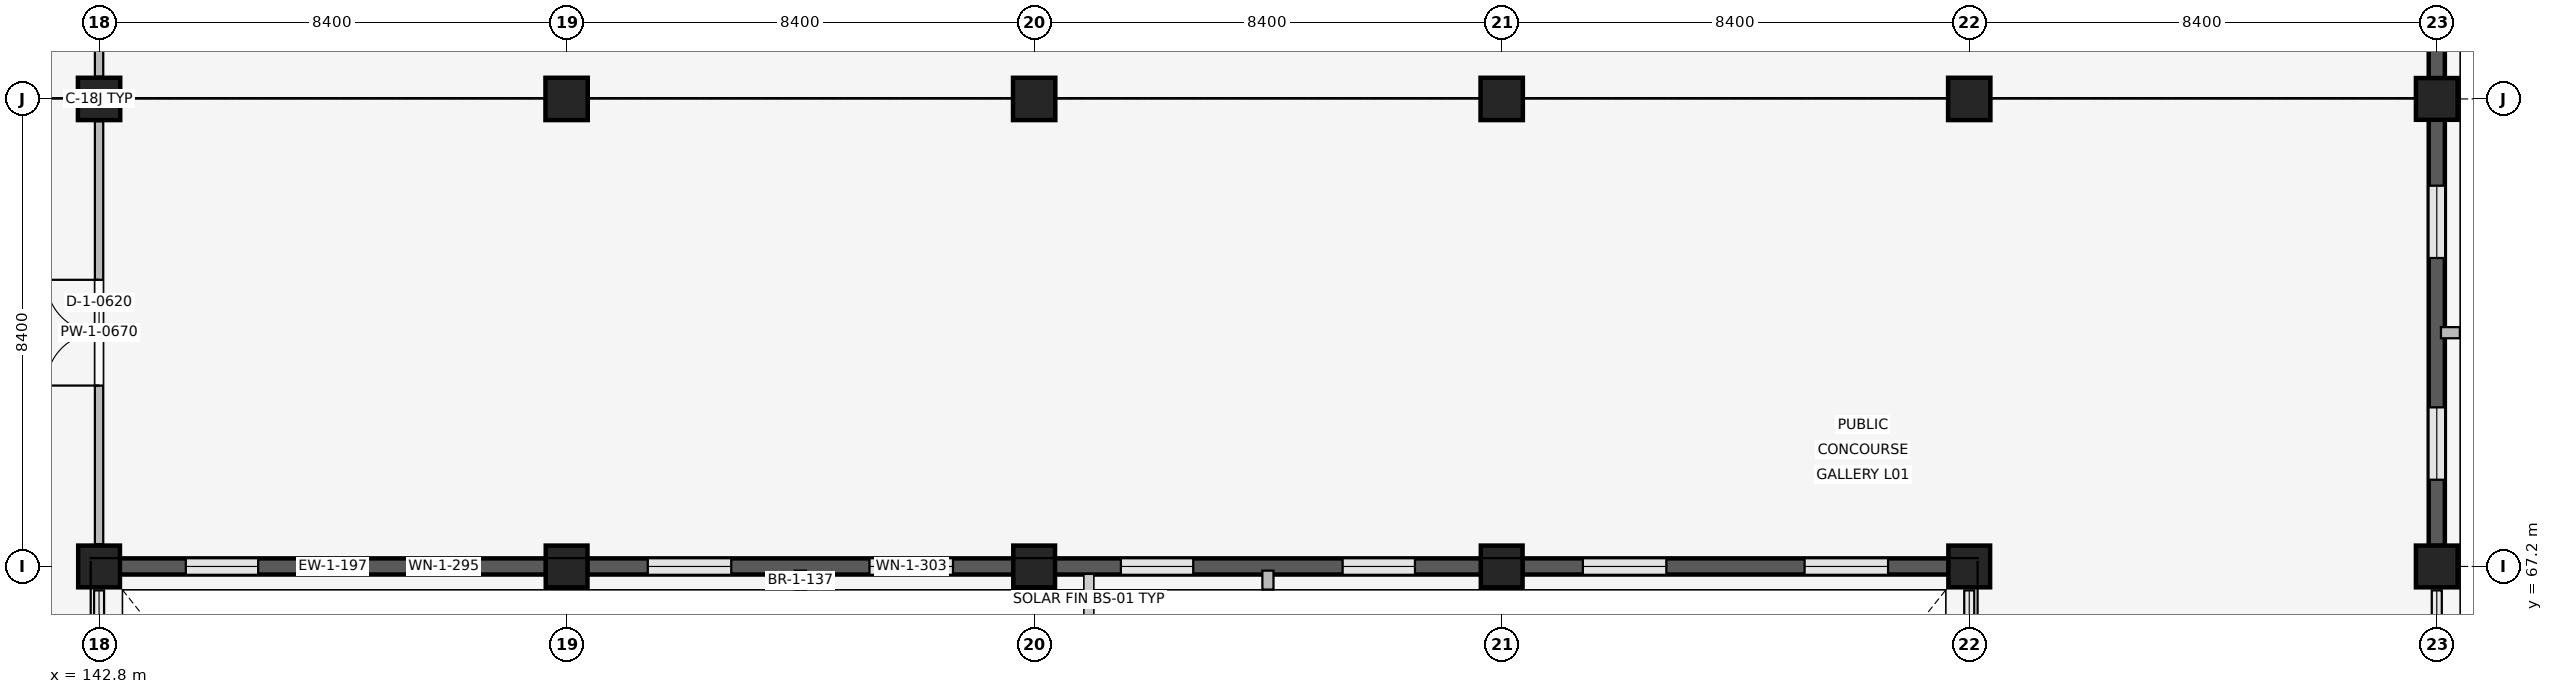
"""IFC4 building model, lengths in metres.
Left out: names, types, materials, properties, quantities, classifications, styles, units other than length and angle.
Written with IfcOpenShell. Run it as: python <this file> out.ifc"""

import sys

from ifc_helpers import new_model, si_unit, direction, frame, frame_2d, origin, origin_2d, place, context, subcontext, project, spatial, rectangle, extrude, element, fill, save


model = new_model("IFC4")
c1 = context("Model", 3, precision=1e-05, world=origin(), true_north=direction((0.0, 1.0)))
c2 = subcontext(c1, "Body", "Model", "MODEL_VIEW")
j1 = project(units=[si_unit("LENGTHUNIT", "METRE"), si_unit("PLANEANGLEUNIT", "RADIAN")], contexts=[c1])
p1 = place(None, origin())
s1 = spatial("IfcSite", under=j1, at=p1, CompositionType="ELEMENT")
p2 = place(p1, origin())
s2 = spatial("IfcBuilding", under=s1, at=p2, CompositionType="ELEMENT")
p3 = place(p2, frame((0.0, 0.0, 4.8)))
s3 = spatial("IfcBuildingStorey", under=s2, at=p3, CompositionType="ELEMENT", Elevation=4.8)
p4 = place(p3, frame((142.8, 67.2, 0.0), z_axis=(0.0, 0.0, 1.0), x_axis=(1.0, 0.0, 0.0)))
e1 = element("IfcColumn", 1, at=p4, inside=s3, PredefinedType="COLUMN", context=c2, shape_type="SweptSolid", body=[
    extrude(rectangle(XDim=0.75, YDim=0.75, at=origin_2d()), origin(), (0.0, 0.0, 1.0), 3.3),
])
p5 = place(p3, frame((142.8, 75.6, 0.0), z_axis=(0.0, 0.0, 1.0), x_axis=(1.0, 0.0, 0.0)))
e2 = element("IfcColumn", 2, at=p5, inside=s3, PredefinedType="COLUMN", context=c2, shape_type="SweptSolid", body=[
    extrude(rectangle(XDim=0.76, YDim=0.76, at=origin_2d()), origin(), (0.0, 0.0, 1.0), 3.3),
])
p6 = place(p3, frame((151.2, 67.2, 0.0), z_axis=(0.0, 0.0, 1.0), x_axis=(1.0, 0.0, 0.0)))
e3 = element("IfcColumn", 3, at=p6, inside=s3, PredefinedType="COLUMN", context=c2, shape_type="SweptSolid", body=[
    extrude(rectangle(XDim=0.75, YDim=0.75, at=origin_2d()), origin(), (0.0, 0.0, 1.0), 3.3),
])
p7 = place(p3, frame((151.2, 75.6, 0.0), z_axis=(0.0, 0.0, 1.0), x_axis=(1.0, 0.0, 0.0)))
e4 = element("IfcColumn", 4, at=p7, inside=s3, PredefinedType="COLUMN", context=c2, shape_type="SweptSolid", body=[
    extrude(rectangle(XDim=0.76, YDim=0.76, at=origin_2d()), origin(), (0.0, 0.0, 1.0), 3.3),
])
p8 = place(p3, frame((159.6, 67.2, 0.0), z_axis=(0.0, 0.0, 1.0), x_axis=(1.0, 0.0, 0.0)))
e5 = element("IfcColumn", 5, at=p8, inside=s3, PredefinedType="COLUMN", context=c2, shape_type="SweptSolid", body=[
    extrude(rectangle(XDim=0.75, YDim=0.75, at=origin_2d()), origin(), (0.0, 0.0, 1.0), 3.3),
])
p9 = place(p3, frame((159.6, 75.6, 0.0), z_axis=(0.0, 0.0, 1.0), x_axis=(1.0, 0.0, 0.0)))
e6 = element("IfcColumn", 6, at=p9, inside=s3, PredefinedType="COLUMN", context=c2, shape_type="SweptSolid", body=[
    extrude(rectangle(XDim=0.76, YDim=0.76, at=origin_2d()), origin(), (0.0, 0.0, 1.0), 3.3),
])
p10 = place(p3, frame((168.0, 67.2, 0.0), z_axis=(0.0, 0.0, 1.0), x_axis=(1.0, 0.0, 0.0)))
e7 = element("IfcColumn", 7, at=p10, inside=s3, PredefinedType="COLUMN", context=c2, shape_type="SweptSolid", body=[
    extrude(rectangle(XDim=0.75, YDim=0.75, at=origin_2d()), origin(), (0.0, 0.0, 1.0), 3.3),
])
p11 = place(p3, frame((168.0, 75.6, 0.0), z_axis=(0.0, 0.0, 1.0), x_axis=(1.0, 0.0, 0.0)))
e8 = element("IfcColumn", 8, at=p11, inside=s3, PredefinedType="COLUMN", context=c2, shape_type="SweptSolid", body=[
    extrude(rectangle(XDim=0.76, YDim=0.76, at=origin_2d()), origin(), (0.0, 0.0, 1.0), 3.3),
])
p12 = place(p3, frame((176.4, 67.2, 0.0), z_axis=(0.0, 0.0, 1.0), x_axis=(1.0, 0.0, 0.0)))
e9 = element("IfcColumn", 9, at=p12, inside=s3, PredefinedType="COLUMN", context=c2, shape_type="SweptSolid", body=[
    extrude(rectangle(XDim=0.75, YDim=0.75, at=origin_2d()), origin(), (0.0, 0.0, 1.0), 3.3),
])
p13 = place(p3, frame((176.4, 75.6, 0.0), z_axis=(0.0, 0.0, 1.0), x_axis=(1.0, 0.0, 0.0)))
e10 = element("IfcColumn", 10, at=p13, inside=s3, PredefinedType="COLUMN", context=c2, shape_type="SweptSolid", body=[
    extrude(rectangle(XDim=0.76, YDim=0.76, at=origin_2d()), origin(), (0.0, 0.0, 1.0), 3.3),
])
for number, where, z_axis, x_axis in (
    (11, (184.8, 67.2, 0.0), (0.0, 0.0, 1.0), (1.0, 0.0, 0.0)),
    (12, (184.8, 75.6, 0.0), (0.0, 0.0, 1.0), (1.0, 0.0, 0.0)),
):
    element("IfcColumn", number, at=place(p3, frame(where, z_axis=z_axis, x_axis=x_axis)), inside=s3, PredefinedType="COLUMN", context=c2, shape_type="SweptSolid", body=[
        extrude(rectangle(XDim=0.75, YDim=0.75, at=origin_2d()), origin(), (0.0, 0.0, 1.0), 3.3),
    ])
p14 = place(p3, frame((150.83, 67.2, 0.0), z_axis=(0.0, 0.0, 1.0), x_axis=(-1.0, 0.0, 0.0)))
e13 = element("IfcWall", 13, at=p14, inside=s3, PredefinedType="SOLIDWALL", context=c2, shape_type="SweptSolid", body=[
    extrude(rectangle(XDim=7.66, YDim=0.29, at=frame_2d((3.83, 0.0))), origin(), (0.0, 0.0, 1.0), 2.42),
])
p15 = place(p14, frame((1.188, 0.0, 1.05)))
e14 = element("IfcOpeningElement", 14, at=p15, cuts=e13, PredefinedType="OPENING", context=c2, shape_type="SweptSolid", body=[
    extrude(rectangle(XDim=1.3, YDim=0.75, at=frame_2d((0.65, 0.375))), frame((0.0, 0.155, 0.0), z_axis=(0.0, -1.0, 0.0), x_axis=(1.0, 0.0, 0.0)), (0.0, 0.0, 1.0), 0.31),
])
p16 = place(p14, frame((5.172, 0.0, 1.05)))
e15 = element("IfcOpeningElement", 15, at=p16, cuts=e13, PredefinedType="OPENING", context=c2, shape_type="SweptSolid", body=[
    extrude(rectangle(XDim=1.3, YDim=0.75, at=frame_2d((0.65, 0.375))), frame((0.0, 0.155, 0.0), z_axis=(0.0, -1.0, 0.0), x_axis=(1.0, 0.0, 0.0)), (0.0, 0.0, 1.0), 0.31),
])
p17 = place(p3, frame((159.23, 67.2, 0.0), z_axis=(0.0, 0.0, 1.0), x_axis=(-1.0, 0.0, 0.0)))
e16 = element("IfcWall", 16, at=p17, inside=s3, PredefinedType="SOLIDWALL", context=c2, shape_type="SweptSolid", body=[
    extrude(rectangle(XDim=7.66, YDim=0.29, at=frame_2d((3.83, 0.0))), origin(), (0.0, 0.0, 1.0), 2.42),
])
p18 = place(p17, frame((1.088, 0.0, 1.05)))
e17 = element("IfcOpeningElement", 17, at=p18, cuts=e16, PredefinedType="OPENING", context=c2, shape_type="SweptSolid", body=[
    extrude(rectangle(XDim=1.5, YDim=0.75, at=frame_2d((0.75, 0.375))), frame((0.0, 0.155, 0.0), z_axis=(0.0, -1.0, 0.0), x_axis=(1.0, 0.0, 0.0)), (0.0, 0.0, 1.0), 0.31),
])
p19 = place(p17, frame((5.072, 0.0, 1.05)))
e18 = element("IfcOpeningElement", 18, at=p19, cuts=e16, PredefinedType="OPENING", context=c2, shape_type="SweptSolid", body=[
    extrude(rectangle(XDim=1.5, YDim=0.75, at=frame_2d((0.75, 0.375))), frame((0.0, 0.155, 0.0), z_axis=(0.0, -1.0, 0.0), x_axis=(1.0, 0.0, 0.0)), (0.0, 0.0, 1.0), 0.31),
])
p20 = place(p3, frame((155.4, 67.125, 0.0), z_axis=(0.0, 0.0, 1.0), x_axis=(0.0, -1.0, 0.0)))
e19 = element("IfcWall", 19, at=p20, inside=s3, PredefinedType="ELEMENTEDWALL", context=c2, shape_type="SweptSolid", body=[
    extrude(rectangle(XDim=0.34, YDim=0.2, at=frame_2d((0.17, 0.0))), origin(), (0.0, 0.0, 1.0), 2.4),
])
p21 = place(p3, frame((167.63, 67.2, 0.0), z_axis=(0.0, 0.0, 1.0), x_axis=(-1.0, 0.0, 0.0)))
e20 = element("IfcWall", 20, at=p21, inside=s3, PredefinedType="SOLIDWALL", context=c2, shape_type="SweptSolid", body=[
    extrude(rectangle(XDim=7.66, YDim=0.29, at=frame_2d((3.83, 0.0))), origin(), (0.0, 0.0, 1.0), 2.42),
])
p22 = place(p21, frame((1.188, 0.0, 1.05)))
e21 = element("IfcOpeningElement", 21, at=p22, cuts=e20, PredefinedType="OPENING", context=c2, shape_type="SweptSolid", body=[
    extrude(rectangle(XDim=1.3, YDim=0.75, at=frame_2d((0.65, 0.375))), frame((0.0, 0.155, 0.0), z_axis=(0.0, -1.0, 0.0), x_axis=(1.0, 0.0, 0.0)), (0.0, 0.0, 1.0), 0.31),
])
p23 = place(p21, frame((5.172, 0.0, 1.05)))
e22 = element("IfcOpeningElement", 22, at=p23, cuts=e20, PredefinedType="OPENING", context=c2, shape_type="SweptSolid", body=[
    extrude(rectangle(XDim=1.3, YDim=0.75, at=frame_2d((0.65, 0.375))), frame((0.0, 0.155, 0.0), z_axis=(0.0, -1.0, 0.0), x_axis=(1.0, 0.0, 0.0)), (0.0, 0.0, 1.0), 0.31),
])
p24 = place(p3, frame((163.8, 67.125, 0.0), z_axis=(0.0, 0.0, 1.0), x_axis=(0.0, -1.0, 0.0)))
e23 = element("IfcWall", 23, at=p24, inside=s3, PredefinedType="ELEMENTEDWALL", context=c2, shape_type="SweptSolid", body=[
    extrude(rectangle(XDim=0.34, YDim=0.2, at=frame_2d((0.17, 0.0))), origin(), (0.0, 0.0, 1.0), 2.4),
])
p25 = place(p3, frame((176.03, 67.2, 0.0), z_axis=(0.0, 0.0, 1.0), x_axis=(-1.0, 0.0, 0.0)))
e24 = element("IfcWall", 24, at=p25, inside=s3, PredefinedType="SOLIDWALL", context=c2, shape_type="SweptSolid", body=[
    extrude(rectangle(XDim=7.66, YDim=0.29, at=frame_2d((3.83, 0.0))), origin(), (0.0, 0.0, 1.0), 2.42),
])
p26 = place(p25, frame((1.088, 0.0, 1.05)))
e25 = element("IfcOpeningElement", 25, at=p26, cuts=e24, PredefinedType="OPENING", context=c2, shape_type="SweptSolid", body=[
    extrude(rectangle(XDim=1.5, YDim=0.75, at=frame_2d((0.75, 0.375))), frame((0.0, 0.155, 0.0), z_axis=(0.0, -1.0, 0.0), x_axis=(1.0, 0.0, 0.0)), (0.0, 0.0, 1.0), 0.31),
])
p27 = place(p25, frame((5.072, 0.0, 1.05)))
e26 = element("IfcOpeningElement", 26, at=p27, cuts=e24, PredefinedType="OPENING", context=c2, shape_type="SweptSolid", body=[
    extrude(rectangle(XDim=1.5, YDim=0.75, at=frame_2d((0.75, 0.375))), frame((0.0, 0.155, 0.0), z_axis=(0.0, -1.0, 0.0), x_axis=(1.0, 0.0, 0.0)), (0.0, 0.0, 1.0), 0.31),
])
p28 = place(p3, frame((184.8, 75.23, 0.0), z_axis=(0.0, 0.0, 1.0), x_axis=(0.0, -1.0, 0.0)))
e27 = element("IfcWall", 27, at=p28, inside=s3, PredefinedType="SOLIDWALL", context=c2, shape_type="SweptSolid", body=[
    extrude(rectangle(XDim=7.66, YDim=0.29, at=frame_2d((3.83, 0.0))), origin(), (0.0, 0.0, 1.0), 2.42),
])
p29 = place(p28, frame((1.188, 0.0, 1.05)))
e28 = element("IfcOpeningElement", 28, at=p29, cuts=e27, PredefinedType="OPENING", context=c2, shape_type="SweptSolid", body=[
    extrude(rectangle(XDim=1.3, YDim=0.75, at=frame_2d((0.65, 0.375))), frame((0.0, 0.155, 0.0), z_axis=(0.0, -1.0, 0.0), x_axis=(1.0, 0.0, 0.0)), (0.0, 0.0, 1.0), 0.31),
])
p30 = place(p28, frame((5.172, 0.0, 1.05)))
e29 = element("IfcOpeningElement", 29, at=p30, cuts=e27, PredefinedType="OPENING", context=c2, shape_type="SweptSolid", body=[
    extrude(rectangle(XDim=1.3, YDim=0.75, at=frame_2d((0.65, 0.375))), frame((0.0, 0.155, 0.0), z_axis=(0.0, -1.0, 0.0), x_axis=(1.0, 0.0, 0.0)), (0.0, 0.0, 1.0), 0.31),
])
p31 = place(p3, frame((184.875, 71.4, 0.0), z_axis=(0.0, 0.0, 1.0), x_axis=(1.0, 0.0, 0.0)))
e30 = element("IfcWall", 30, at=p31, inside=s3, PredefinedType="ELEMENTEDWALL", context=c2, shape_type="SweptSolid", body=[
    extrude(rectangle(XDim=0.34, YDim=0.2, at=frame_2d((0.17, 0.0))), origin(), (0.0, 0.0, 1.0), 2.4),
])
p32 = place(p3, frame((184.8, 83.63, 0.0), z_axis=(0.0, 0.0, 1.0), x_axis=(0.0, -1.0, 0.0)))
e31 = element("IfcWall", 31, at=p32, inside=s3, PredefinedType="SOLIDWALL", context=c2, shape_type="SweptSolid", body=[
    extrude(rectangle(XDim=7.66, YDim=0.29, at=frame_2d((3.83, 0.0))), origin(), (0.0, 0.0, 1.0), 2.42),
])
p33 = place(p32, frame((1.088, 0.0, 1.05)))
e32 = element("IfcOpeningElement", 32, at=p33, cuts=e31, PredefinedType="OPENING", context=c2, shape_type="SweptSolid", body=[
    extrude(rectangle(XDim=1.5, YDim=0.75, at=frame_2d((0.75, 0.375))), frame((0.0, 0.155, 0.0), z_axis=(0.0, -1.0, 0.0), x_axis=(1.0, 0.0, 0.0)), (0.0, 0.0, 1.0), 0.31),
])
p34 = place(p32, frame((5.072, 0.0, 1.05)))
e33 = element("IfcOpeningElement", 33, at=p34, cuts=e31, PredefinedType="OPENING", context=c2, shape_type="SweptSolid", body=[
    extrude(rectangle(XDim=1.5, YDim=0.75, at=frame_2d((0.75, 0.375))), frame((0.0, 0.155, 0.0), z_axis=(0.0, -1.0, 0.0), x_axis=(1.0, 0.0, 0.0)), (0.0, 0.0, 1.0), 0.31),
])
p35 = place(p3, frame((142.8, 67.6, 0.0), z_axis=(0.0, 0.0, 1.0), x_axis=(0.0, 1.0, 0.0)))
e34 = element("IfcWall", 34, at=p35, inside=s3, PredefinedType="PARTITIONING", context=c2, shape_type="SweptSolid", body=[
    extrude(rectangle(XDim=7.6, YDim=0.15, at=frame_2d((3.8, 0.0))), origin(), (0.0, 0.0, 1.0), 2.4),
])
p36 = place(p35, frame((2.85, 0.0, 0.0)))
e35 = element("IfcOpeningElement", 35, at=p36, cuts=e34, PredefinedType="OPENING", context=c2, shape_type="SweptSolid", body=[
    extrude(rectangle(XDim=1.9, YDim=2.32, at=frame_2d((0.95, 1.16))), frame((0.0, 0.085, 0.0), z_axis=(0.0, -1.0, 0.0), x_axis=(1.0, 0.0, 0.0)), (0.0, 0.0, 1.0), 0.17),
])
p37 = place(p3, frame((142.8, 76.0, 0.0), z_axis=(0.0, 0.0, 1.0), x_axis=(0.0, 1.0, 0.0)))
e36 = element("IfcWall", 36, at=p37, inside=s3, PredefinedType="PARTITIONING", context=c2, shape_type="SweptSolid", body=[
    extrude(rectangle(XDim=24.4, YDim=0.15, at=frame_2d((12.2, 0.0))), origin(), (0.0, 0.0, 1.0), 2.4),
])
p38 = place(p37, frame((3.4, 0.0, 0.0)))
e37 = element("IfcOpeningElement", 37, at=p38, cuts=e36, PredefinedType="OPENING", context=c2, shape_type="SweptSolid", body=[
    extrude(rectangle(XDim=1.85, YDim=2.3, at=frame_2d((0.925, 1.15))), frame((0.0, 0.085, 0.0), z_axis=(0.0, -1.0, 0.0), x_axis=(1.0, 0.0, 0.0)), (0.0, 0.0, 1.0), 0.17),
])
p39 = place(p15, origin())
e38 = element("IfcWindow", 38, at=p39, inside=s3, PartitioningType="SINGLE_PANEL", PredefinedType="WINDOW", context=c2, shape_type="SweptSolid", body=[
    extrude(rectangle(XDim=1.3, YDim=0.75, at=frame_2d((0.65, 0.375))), frame((0.0, 0.03, 0.0), z_axis=(0.0, -1.0, 0.0), x_axis=(1.0, 0.0, 0.0)), (0.0, 0.0, 1.0), 0.06),
])
fill(e14, e38)
p40 = place(p16, origin())
e39 = element("IfcWindow", 39, at=p40, inside=s3, PartitioningType="SINGLE_PANEL", PredefinedType="WINDOW", context=c2, shape_type="SweptSolid", body=[
    extrude(rectangle(XDim=1.3, YDim=0.75, at=frame_2d((0.65, 0.375))), frame((0.0, 0.03, 0.0), z_axis=(0.0, -1.0, 0.0), x_axis=(1.0, 0.0, 0.0)), (0.0, 0.0, 1.0), 0.06),
])
fill(e15, e39)
p41 = place(p18, origin())
e40 = element("IfcWindow", 40, at=p41, inside=s3, PartitioningType="SINGLE_PANEL", PredefinedType="WINDOW", context=c2, shape_type="SweptSolid", body=[
    extrude(rectangle(XDim=1.5, YDim=0.75, at=frame_2d((0.75, 0.375))), frame((0.0, 0.03, 0.0), z_axis=(0.0, -1.0, 0.0), x_axis=(1.0, 0.0, 0.0)), (0.0, 0.0, 1.0), 0.06),
])
fill(e17, e40)
p42 = place(p19, origin())
e41 = element("IfcWindow", 41, at=p42, inside=s3, PartitioningType="SINGLE_PANEL", PredefinedType="WINDOW", context=c2, shape_type="SweptSolid", body=[
    extrude(rectangle(XDim=1.5, YDim=0.75, at=frame_2d((0.75, 0.375))), frame((0.0, 0.03, 0.0), z_axis=(0.0, -1.0, 0.0), x_axis=(1.0, 0.0, 0.0)), (0.0, 0.0, 1.0), 0.06),
])
fill(e18, e41)
p43 = place(p22, origin())
e42 = element("IfcWindow", 42, at=p43, inside=s3, PartitioningType="SINGLE_PANEL", PredefinedType="WINDOW", context=c2, shape_type="SweptSolid", body=[
    extrude(rectangle(XDim=1.3, YDim=0.75, at=frame_2d((0.65, 0.375))), frame((0.0, 0.03, 0.0), z_axis=(0.0, -1.0, 0.0), x_axis=(1.0, 0.0, 0.0)), (0.0, 0.0, 1.0), 0.06),
])
fill(e21, e42)
p44 = place(p23, origin())
e43 = element("IfcWindow", 43, at=p44, inside=s3, PartitioningType="SINGLE_PANEL", PredefinedType="WINDOW", context=c2, shape_type="SweptSolid", body=[
    extrude(rectangle(XDim=1.3, YDim=0.75, at=frame_2d((0.65, 0.375))), frame((0.0, 0.03, 0.0), z_axis=(0.0, -1.0, 0.0), x_axis=(1.0, 0.0, 0.0)), (0.0, 0.0, 1.0), 0.06),
])
fill(e22, e43)
p45 = place(p26, origin())
e44 = element("IfcWindow", 44, at=p45, inside=s3, PartitioningType="SINGLE_PANEL", PredefinedType="WINDOW", context=c2, shape_type="SweptSolid", body=[
    extrude(rectangle(XDim=1.5, YDim=0.75, at=frame_2d((0.75, 0.375))), frame((0.0, 0.03, 0.0), z_axis=(0.0, -1.0, 0.0), x_axis=(1.0, 0.0, 0.0)), (0.0, 0.0, 1.0), 0.06),
])
fill(e25, e44)
p46 = place(p27, origin())
e45 = element("IfcWindow", 45, at=p46, inside=s3, PartitioningType="SINGLE_PANEL", PredefinedType="WINDOW", context=c2, shape_type="SweptSolid", body=[
    extrude(rectangle(XDim=1.5, YDim=0.75, at=frame_2d((0.75, 0.375))), frame((0.0, 0.03, 0.0), z_axis=(0.0, -1.0, 0.0), x_axis=(1.0, 0.0, 0.0)), (0.0, 0.0, 1.0), 0.06),
])
fill(e26, e45)
p47 = place(p29, origin())
e46 = element("IfcWindow", 46, at=p47, inside=s3, PartitioningType="SINGLE_PANEL", PredefinedType="WINDOW", context=c2, shape_type="SweptSolid", body=[
    extrude(rectangle(XDim=1.3, YDim=0.75, at=frame_2d((0.65, 0.375))), frame((0.0, 0.03, 0.0), z_axis=(0.0, -1.0, 0.0), x_axis=(1.0, 0.0, 0.0)), (0.0, 0.0, 1.0), 0.06),
])
fill(e28, e46)
p48 = place(p30, origin())
e47 = element("IfcWindow", 47, at=p48, inside=s3, PartitioningType="SINGLE_PANEL", PredefinedType="WINDOW", context=c2, shape_type="SweptSolid", body=[
    extrude(rectangle(XDim=1.3, YDim=0.75, at=frame_2d((0.65, 0.375))), frame((0.0, 0.03, 0.0), z_axis=(0.0, -1.0, 0.0), x_axis=(1.0, 0.0, 0.0)), (0.0, 0.0, 1.0), 0.06),
])
fill(e29, e47)
p49 = place(p36, origin())
e48 = element("IfcDoor", 48, at=p49, inside=s3, OperationType="DOUBLE_SWING_LEFT", PredefinedType="DOOR", context=c2, shape_type="SweptSolid", body=[
    extrude(rectangle(XDim=1.9, YDim=2.32, at=frame_2d((0.95, 1.16))), frame((0.0, 0.025, 0.0), z_axis=(0.0, -1.0, 0.0), x_axis=(1.0, 0.0, 0.0)), (0.0, 0.0, 1.0), 0.05),
])
fill(e35, e48)
save(model, sys.argv[1])
